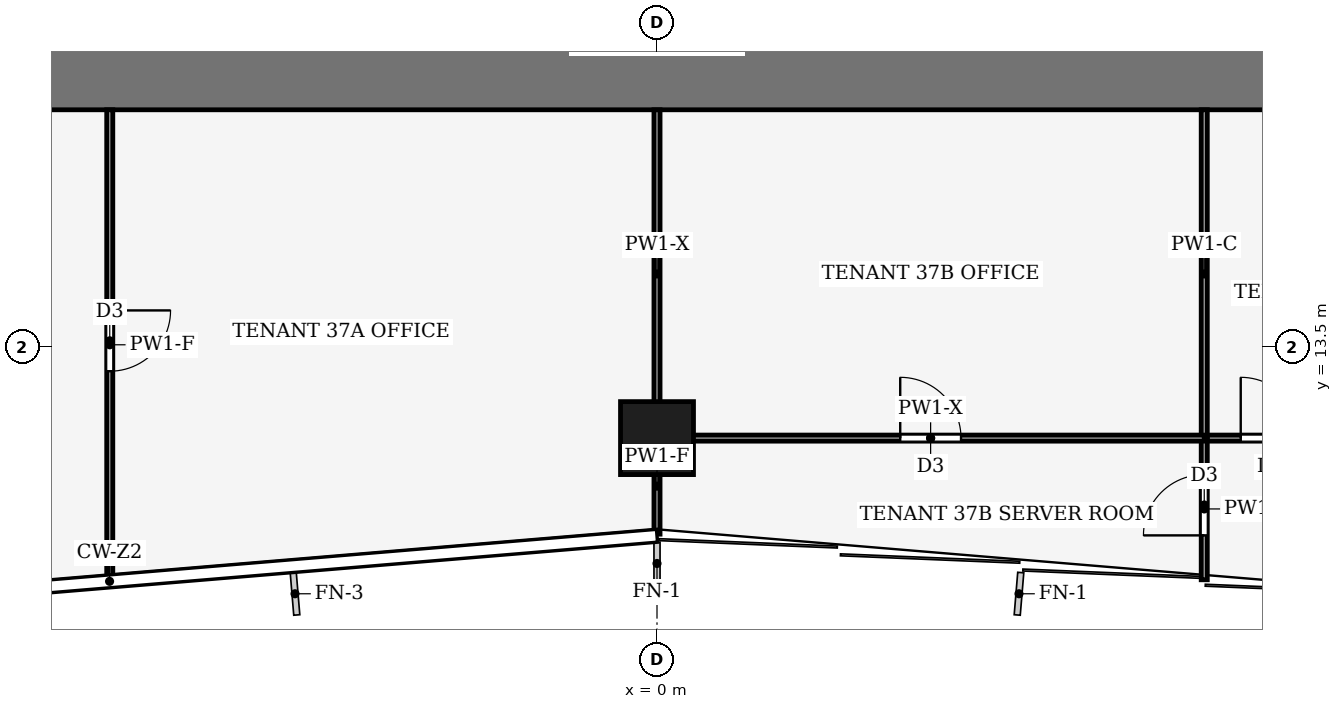
"""IFC4 building model, lengths in metres.
Left out: names, types, materials, properties, quantities, classifications, styles, units other than length and angle.
Written with IfcOpenShell. Run it as: python <this file> out.ifc"""

import sys

from ifc_helpers import new_model, si_unit, direction, frame, frame_2d, origin, origin_2d, place, context, subcontext, project, spatial, rectangle, hollow_rectangle, extrude, element, fill, save


model = new_model("IFC4")
c1 = context("Model", 3, precision=1e-05, world=origin(), true_north=direction((0.0, 1.0)))
c2 = subcontext(c1, "Body", "Model", "MODEL_VIEW")
j1 = project(units=[si_unit("LENGTHUNIT", "METRE"), si_unit("PLANEANGLEUNIT", "RADIAN")], contexts=[c1])
p1 = place(None, origin())
s1 = spatial("IfcSite", under=j1, at=p1, CompositionType="ELEMENT")
p2 = place(p1, origin())
s2 = spatial("IfcBuilding", under=s1, at=p2, CompositionType="ELEMENT")
p3 = place(p2, frame((0.0, 0.0, 162.0)))
s3 = spatial("IfcBuildingStorey", under=s2, at=p3, CompositionType="ELEMENT", Elevation=162.0)
p4 = place(p3, frame((-13.6, 17.9, -0.13), z_axis=(0.0, 0.0, 1.0), x_axis=(1.0, 0.0, 0.0)))
e1 = element("IfcWall", 1, at=p4, inside=s3, PredefinedType="SHEAR", context=c2, shape_type="SweptSolid", body=[
    extrude(rectangle(XDim=27.2, YDim=1.0, at=frame_2d((13.6, 0.0))), origin(), (0.0, 0.0, 1.0), 4.0),
])
p5 = place(p3, frame((0.0, 12.0, 0.0), z_axis=(0.0, 0.0, 1.0), x_axis=(1.0, 0.0, 0.0)))
e2 = element("IfcColumn", 2, at=p5, inside=s3, PredefinedType="COLUMN", context=c2, shape_type="SweptSolid", body=[
    extrude(hollow_rectangle(XDim=1.2, YDim=1.2, WallThickness=0.07, at=origin_2d()), origin(), (0.0, 0.0, 1.0), 4.0),
])
p6 = place(p3, frame((-9.0, 17.4, 0.0), z_axis=(0.0, 0.0, 1.0), x_axis=(0.0, -1.0, 0.0)))
e3 = element("IfcWall", 3, at=p6, inside=s3, PredefinedType="PARTITIONING", context=c2, shape_type="SweptSolid", body=[
    extrude(rectangle(XDim=7.73, YDim=0.1, at=frame_2d((3.865, 0.0))), origin(), (0.0, 0.0, 1.0), 3.04),
])
p7 = place(p6, frame((3.3, 0.0, 0.0)))
e4 = element("IfcOpeningElement", 4, at=p7, cuts=e3, PredefinedType="OPENING", context=c2, shape_type="SweptSolid", body=[
    extrude(rectangle(XDim=1.0, YDim=2.1, at=frame_2d((0.5, 1.05))), frame((0.0, 0.06, 0.0), z_axis=(0.0, -1.0, 0.0), x_axis=(1.0, 0.0, 0.0)), (0.0, 0.0, 1.0), 0.12),
])
p8 = place(p3, frame((0.0, 10.42, 0.0), z_axis=(0.0, 0.0, 1.0), x_axis=(0.0, 1.0, 0.0)))
e5 = element("IfcWall", 5, at=p8, inside=s3, PredefinedType="PARTITIONING", context=c2, shape_type="SweptSolid", body=[
    extrude(rectangle(XDim=1.58, YDim=0.1, at=frame_2d((0.79, 0.0))), origin(), (0.0, 0.0, 1.0), 3.04),
])
p9 = place(p3, frame((0.0, 12.0, 0.0), z_axis=(0.0, 0.0, 1.0), x_axis=(0.0, 1.0, 0.0)))
e6 = element("IfcWall", 6, at=p9, inside=s3, PredefinedType="PARTITIONING", context=c2, shape_type="SweptSolid", body=[
    extrude(rectangle(XDim=5.4, YDim=0.1, at=frame_2d((2.7, 0.0))), origin(), (0.0, 0.0, 1.0), 3.54),
])
p10 = place(p3, frame((9.0, 12.0, 0.0), z_axis=(0.0, 0.0, 1.0), x_axis=(1.0, 0.0, 0.0)))
e7 = element("IfcWall", 7, at=p10, inside=s3, PredefinedType="PARTITIONING", context=c2, shape_type="SweptSolid", body=[
    extrude(rectangle(XDim=4.6, YDim=0.1, at=frame_2d((2.3, 0.0))), origin(), (0.0, 0.0, 1.0), 3.87),
])
p11 = place(p10, frame((0.6, 0.0, 0.0)))
e8 = element("IfcOpeningElement", 8, at=p11, cuts=e7, PredefinedType="OPENING", context=c2, shape_type="SweptSolid", body=[
    extrude(rectangle(XDim=1.0, YDim=2.1, at=frame_2d((0.5, 1.05))), frame((0.0, 0.06, 0.0), z_axis=(0.0, -1.0, 0.0), x_axis=(1.0, 0.0, 0.0)), (0.0, 0.0, 1.0), 0.12),
])
p12 = place(p3, frame((9.0, 9.67, 0.0), z_axis=(0.0, 0.0, 1.0), x_axis=(0.0, 1.0, 0.0)))
e9 = element("IfcWall", 9, at=p12, inside=s3, PredefinedType="PARTITIONING", context=c2, shape_type="SweptSolid", body=[
    extrude(rectangle(XDim=2.33, YDim=0.1, at=frame_2d((1.165, 0.0))), origin(), (0.0, 0.0, 1.0), 3.04),
])
p13 = place(p12, frame((0.73, 0.0, 0.0)))
e10 = element("IfcOpeningElement", 10, at=p13, cuts=e9, PredefinedType="OPENING", context=c2, shape_type="SweptSolid", body=[
    extrude(rectangle(XDim=1.0, YDim=2.1, at=frame_2d((0.5, 1.05))), frame((0.0, 0.06, 0.0), z_axis=(0.0, -1.0, 0.0), x_axis=(1.0, 0.0, 0.0)), (0.0, 0.0, 1.0), 0.12),
])
p14 = place(p3, frame((9.0, 17.4, 0.0), z_axis=(0.0, 0.0, 1.0), x_axis=(0.0, -1.0, 0.0)))
e11 = element("IfcWall", 11, at=p14, inside=s3, PredefinedType="PARTITIONING", context=c2, shape_type="SweptSolid", body=[
    extrude(rectangle(XDim=5.4, YDim=0.1, at=frame_2d((2.7, 0.0))), origin(), (0.0, 0.0, 1.0), 3.87),
])
p15 = place(p3, frame((0.0, 12.0, 0.0), z_axis=(0.0, 0.0, 1.0), x_axis=(1.0, 0.0, 0.0)))
e12 = element("IfcWall", 12, at=p15, inside=s3, PredefinedType="PARTITIONING", context=c2, shape_type="SweptSolid", body=[
    extrude(rectangle(XDim=9.0, YDim=0.1, at=frame_2d((4.5, 0.0))), origin(), (0.0, 0.0, 1.0), 3.54),
])
p16 = place(p15, frame((4.0, 0.0, 0.0)))
e13 = element("IfcOpeningElement", 13, at=p16, cuts=e12, PredefinedType="OPENING", context=c2, shape_type="SweptSolid", body=[
    extrude(rectangle(XDim=1.0, YDim=2.1, at=frame_2d((0.5, 1.05))), frame((0.0, 0.06, 0.0), z_axis=(0.0, -1.0, 0.0), x_axis=(1.0, 0.0, 0.0)), (0.0, 0.0, 1.0), 0.12),
])
p17 = place(p7, origin())
e14 = element("IfcDoor", 14, at=p17, inside=s3, OperationType="SINGLE_SWING_LEFT", PredefinedType="DOOR", context=c2, shape_type="SweptSolid", body=[
    extrude(rectangle(XDim=1.0, YDim=2.1, at=frame_2d((0.5, 1.05))), frame((0.0, 0.025, 0.0), z_axis=(0.0, -1.0, 0.0), x_axis=(1.0, 0.0, 0.0)), (0.0, 0.0, 1.0), 0.05),
])
fill(e4, e14)
p18 = place(p11, origin())
e15 = element("IfcDoor", 15, at=p18, inside=s3, OperationType="SINGLE_SWING_LEFT", PredefinedType="DOOR", context=c2, shape_type="SweptSolid", body=[
    extrude(rectangle(XDim=1.0, YDim=2.1, at=frame_2d((0.5, 1.05))), frame((0.0, 0.025, 0.0), z_axis=(0.0, -1.0, 0.0), x_axis=(1.0, 0.0, 0.0)), (0.0, 0.0, 1.0), 0.05),
])
fill(e8, e15)
p19 = place(p13, origin())
e16 = element("IfcDoor", 16, at=p19, inside=s3, OperationType="SINGLE_SWING_RIGHT", PredefinedType="DOOR", context=c2, shape_type="SweptSolid", body=[
    extrude(rectangle(XDim=1.0, YDim=2.1, at=frame_2d((0.5, 1.05))), frame((0.0, 0.025, 0.0), z_axis=(0.0, -1.0, 0.0), x_axis=(1.0, 0.0, 0.0)), (0.0, 0.0, 1.0), 0.05),
])
fill(e10, e16)
p20 = place(p16, origin())
e17 = element("IfcDoor", 17, at=p20, inside=s3, OperationType="SINGLE_SWING_RIGHT", PredefinedType="DOOR", context=c2, shape_type="SweptSolid", body=[
    extrude(rectangle(XDim=1.0, YDim=2.1, at=frame_2d((0.5, 1.05))), frame((0.0, 0.025, 0.0), z_axis=(0.0, -1.0, 0.0), x_axis=(1.0, 0.0, 0.0)), (0.0, 0.0, 1.0), 0.05),
])
fill(e13, e17)
save(model, sys.argv[1])
